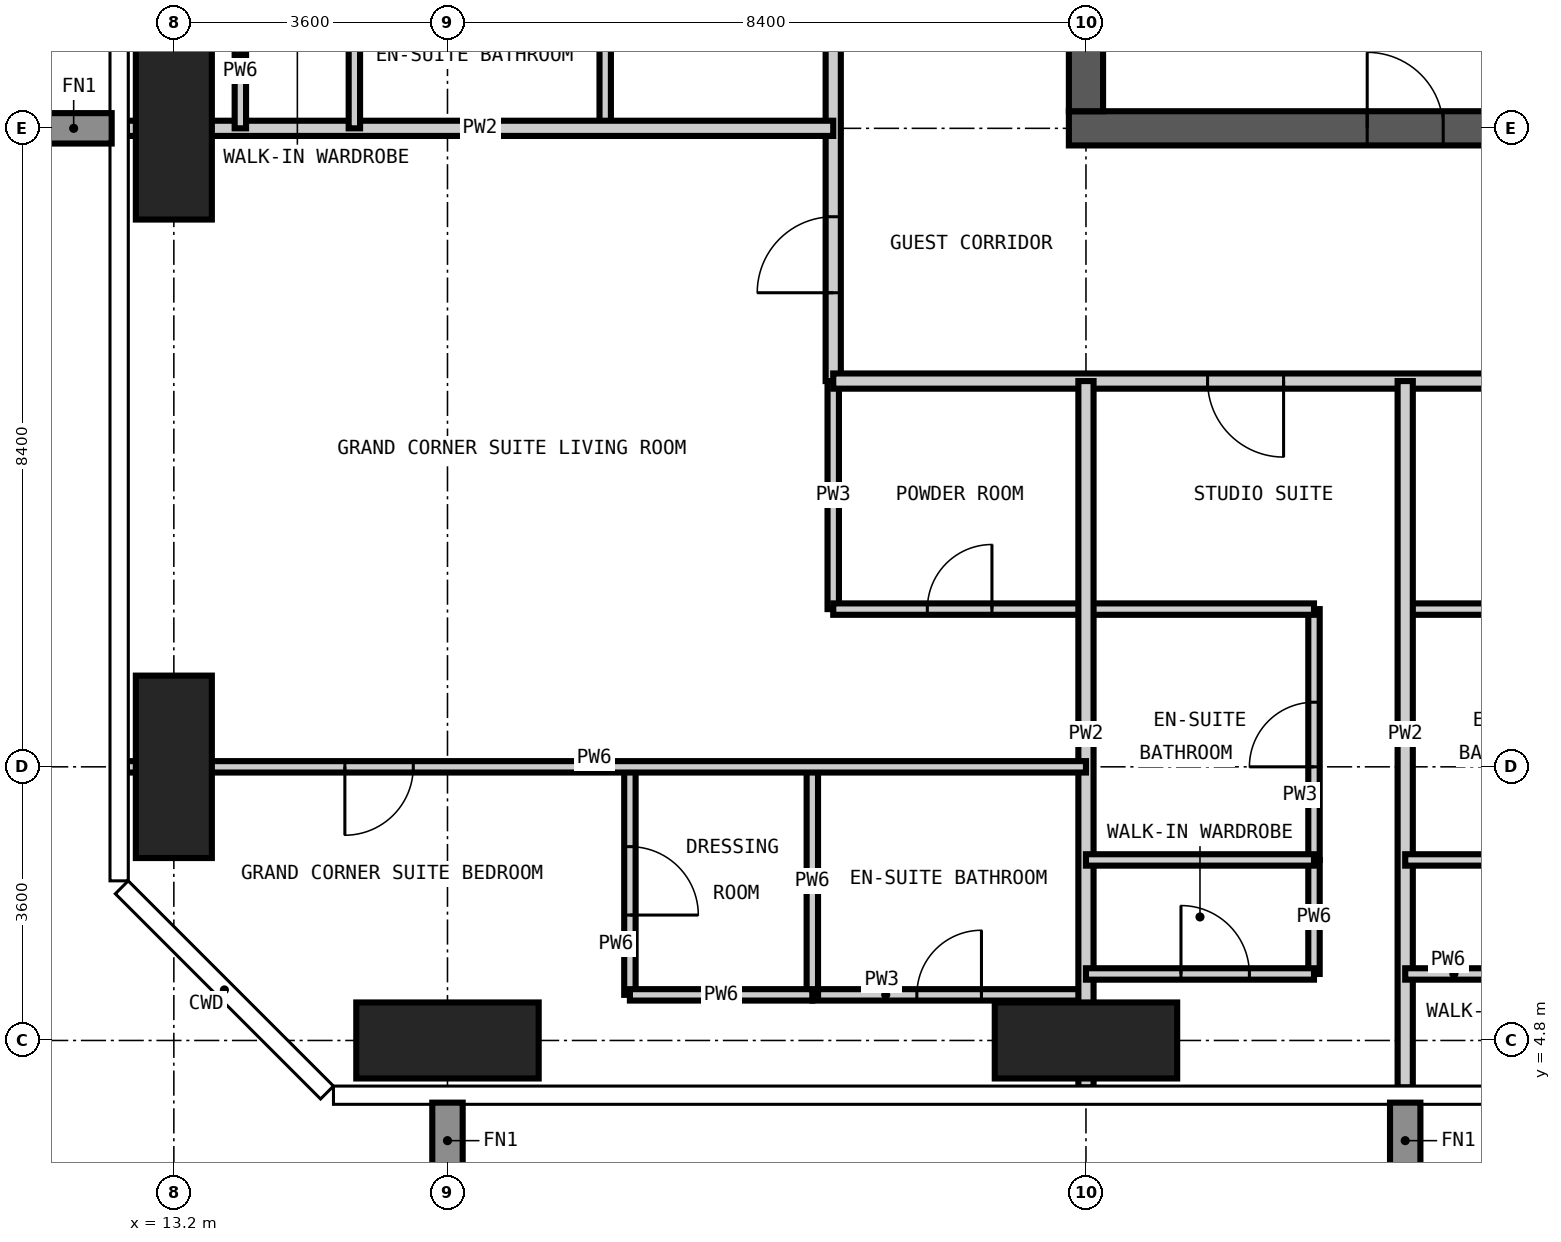
"""IFC4 building model, lengths in metres.
Left out: names, types, materials, properties, quantities, classifications, styles, units other than length and angle.
Written with IfcOpenShell. Run it as: python <this file> out.ifc"""

import sys

from ifc_helpers import new_model, si_unit, direction, frame, frame_2d, origin, origin_2d, place, context, subcontext, project, spatial, rectangle, extrude, element, fill, save


model = new_model("IFC4")
c1 = context("Model", 3, precision=1e-05, world=origin(), true_north=direction((0.0, 1.0)))
c2 = subcontext(c1, "Body", "Model", "MODEL_VIEW")
j1 = project(units=[si_unit("LENGTHUNIT", "METRE"), si_unit("PLANEANGLEUNIT", "RADIAN")], contexts=[c1])
p1 = place(None, origin())
s1 = spatial("IfcSite", under=j1, at=p1, CompositionType="ELEMENT")
p2 = place(p1, origin())
s2 = spatial("IfcBuilding", under=s1, at=p2, CompositionType="ELEMENT")
p3 = place(p2, frame((0.0, 0.0, 241.2)))
s3 = spatial("IfcBuildingStorey", under=s2, at=p3, CompositionType="ELEMENT", Elevation=241.2)
for number, where, z_axis, x_axis in (
    (1, (13.2, 8.4, -0.35), (0.0, 0.0, 1.0), (1.0, 0.0, 0.0)),
    (2, (13.2, 16.8, -0.35), (0.0, 0.0, 1.0), (1.0, 0.0, 0.0)),
):
    element("IfcColumn", number, at=place(p3, frame(where, z_axis=z_axis, x_axis=x_axis)), inside=s3, PredefinedType="COLUMN", context=c2, shape_type="SweptSolid", body=[
        extrude(rectangle(XDim=1.0, YDim=2.4, at=origin_2d()), origin(), (0.0, 0.0, 1.0), 3.9),
    ])
for number, where, z_axis, x_axis in (
    (3, (16.8, 4.8, -0.35), (0.0, 0.0, 1.0), (1.0, 0.0, 0.0)),
    (4, (25.2, 4.8, -0.35), (0.0, 0.0, 1.0), (1.0, 0.0, 0.0)),
):
    element("IfcColumn", number, at=place(p3, frame(where, z_axis=z_axis, x_axis=x_axis)), inside=s3, PredefinedType="COLUMN", context=c2, shape_type="SweptSolid", body=[
        extrude(rectangle(XDim=2.4, YDim=1.0, at=origin_2d()), origin(), (0.0, 0.0, 1.0), 3.9),
    ])
p4 = place(p3, frame((24.975, 16.8, -0.35), z_axis=(0.0, 0.0, 1.0), x_axis=(1.0, 0.0, 0.0)))
e5 = element("IfcWall", 5, at=p4, inside=s3, PredefinedType="SHEAR", context=c2, shape_type="SweptSolid", body=[
    extrude(rectangle(XDim=17.25, YDim=0.45, at=frame_2d((8.625, 0.0))), origin(), (0.0, 0.0, 1.0), 3.9),
])
p5 = place(p4, frame((3.925, 0.0, 0.35)))
e6 = element("IfcOpeningElement", 6, at=p5, cuts=e5, PredefinedType="OPENING", context=c2, shape_type="SweptSolid", body=[
    extrude(rectangle(XDim=1.0, YDim=2.1, at=frame_2d((0.5, 1.05))), frame((0.0, 0.235, 0.0), z_axis=(0.0, -1.0, 0.0), x_axis=(1.0, 0.0, 0.0)), (0.0, 0.0, 1.0), 0.47),
])
p6 = place(p4, frame((10.225, 0.0, 0.35)))
e7 = element("IfcOpeningElement", 7, at=p6, cuts=e5, PredefinedType="OPENING", context=c2, shape_type="SweptSolid", body=[
    extrude(rectangle(XDim=1.0, YDim=2.1, at=frame_2d((0.5, 1.05))), frame((0.0, 0.235, 0.0), z_axis=(0.0, -1.0, 0.0), x_axis=(1.0, 0.0, 0.0)), (0.0, 0.0, 1.0), 0.47),
])
p7 = place(p3, frame((25.2, 41.775, -0.35), z_axis=(0.0, 0.0, 1.0), x_axis=(0.0, -1.0, 0.0)))
e8 = element("IfcWall", 8, at=p7, inside=s3, PredefinedType="SHEAR", context=c2, shape_type="SweptSolid", body=[
    extrude(rectangle(XDim=24.75, YDim=0.45, at=frame_2d((12.375, 0.0))), origin(), (0.0, 0.0, 1.0), 3.9),
])
p8 = place(p7, frame((11.875, 0.0, 0.35)))
e9 = element("IfcOpeningElement", 9, at=p8, cuts=e8, PredefinedType="OPENING", context=c2, shape_type="SweptSolid", body=[
    extrude(rectangle(XDim=1.0, YDim=2.1, at=frame_2d((0.5, 1.05))), frame((0.0, 0.235, 0.0), z_axis=(0.0, -1.0, 0.0), x_axis=(1.0, 0.0, 0.0)), (0.0, 0.0, 1.0), 0.47),
])
for number, where, z_axis, x_axis in (
    (10, (18.875, 16.8, 0.0), (0.0, 0.0, 1.0), (0.0, 1.0, 0.0)),
    (11, (21.875, 10.475, 0.0), (0.0, 0.0, 1.0), (0.0, 1.0, 0.0)),
):
    element("IfcWall", number, at=place(p3, frame(where, z_axis=z_axis, x_axis=x_axis)), inside=s3, PredefinedType="PARTITIONING", context=c2, shape_type="SweptSolid", body=[
        extrude(rectangle(XDim=3.0, YDim=0.15, at=frame_2d((1.5, 0.0))), origin(), (0.0, 0.0, 1.0), 3.55),
    ])
p9 = place(p3, frame((28.2, 7.175, 0.0), z_axis=(0.0, 0.0, 1.0), x_axis=(0.0, 1.0, 0.0)))
e12 = element("IfcWall", 12, at=p9, inside=s3, PredefinedType="PARTITIONING", context=c2, shape_type="SweptSolid", body=[
    extrude(rectangle(XDim=3.3, YDim=0.15, at=frame_2d((1.65, 0.0))), origin(), (0.0, 0.0, 1.0), 3.55),
])
p10 = place(p9, frame((1.225, 0.0, 0.0)))
e13 = element("IfcOpeningElement", 13, at=p10, cuts=e12, PredefinedType="OPENING", context=c2, shape_type="SweptSolid", body=[
    extrude(rectangle(XDim=0.85, YDim=2.1, at=frame_2d((0.425, 1.05))), frame((0.0, 0.085, 0.0), z_axis=(0.0, -1.0, 0.0), x_axis=(1.0, 0.0, 0.0)), (0.0, 0.0, 1.0), 0.17),
])
p11 = place(p3, frame((21.6, 5.4, 0.0), z_axis=(0.0, 0.0, 1.0), x_axis=(1.0, 0.0, 0.0)))
e14 = element("IfcWall", 14, at=p11, inside=s3, PredefinedType="PARTITIONING", context=c2, shape_type="SweptSolid", body=[
    extrude(rectangle(XDim=3.6, YDim=0.15, at=frame_2d((1.8, 0.0))), origin(), (0.0, 0.0, 1.0), 3.55),
])
p12 = place(p11, frame((1.375, 0.0, 0.0)))
e15 = element("IfcOpeningElement", 15, at=p12, cuts=e14, PredefinedType="OPENING", context=c2, shape_type="SweptSolid", body=[
    extrude(rectangle(XDim=0.85, YDim=2.1, at=frame_2d((0.425, 1.05))), frame((0.0, 0.085, 0.0), z_axis=(0.0, -1.0, 0.0), x_axis=(1.0, 0.0, 0.0)), (0.0, 0.0, 1.0), 0.17),
])
p13 = place(p3, frame((21.875, 10.475, 0.0), z_axis=(0.0, 0.0, 1.0), x_axis=(1.0, 0.0, 0.0)))
e16 = element("IfcWall", 16, at=p13, inside=s3, PredefinedType="PARTITIONING", context=c2, shape_type="SweptSolid", body=[
    extrude(rectangle(XDim=6.325, YDim=0.15, at=frame_2d((3.163, 0.0))), origin(), (0.0, 0.0, 1.0), 3.55),
])
p14 = place(p13, frame((1.238, 0.0, 0.0)))
e17 = element("IfcOpeningElement", 17, at=p14, cuts=e16, PredefinedType="OPENING", context=c2, shape_type="SweptSolid", body=[
    extrude(rectangle(XDim=0.85, YDim=2.1, at=frame_2d((0.425, 1.05))), frame((0.0, 0.085, 0.0), z_axis=(0.0, -1.0, 0.0), x_axis=(1.0, 0.0, 0.0)), (0.0, 0.0, 1.0), 0.17),
])
p15 = place(p3, frame((29.4, 10.475, 0.0), z_axis=(0.0, 0.0, 1.0), x_axis=(1.0, 0.0, 0.0)))
e18 = element("IfcWall", 18, at=p15, inside=s3, PredefinedType="PARTITIONING", context=c2, shape_type="SweptSolid", body=[
    extrude(rectangle(XDim=3.0, YDim=0.15, at=frame_2d((1.5, 0.0))), origin(), (0.0, 0.0, 1.0), 3.55),
])
p16 = place(p3, frame((21.875, 13.475, 0.0), z_axis=(0.0, 0.0, 1.0), x_axis=(0.0, 1.0, 0.0)))
e19 = element("IfcWall", 19, at=p16, inside=s3, PredefinedType="PARTITIONING", context=c2, shape_type="SweptSolid", body=[
    extrude(rectangle(XDim=31.25, YDim=0.2, at=frame_2d((15.625, 0.0))), origin(), (0.0, 0.0, 1.0), 3.55),
])
p17 = place(p16, frame((7.025, 0.0, 0.0)))
e20 = element("IfcOpeningElement", 20, at=p17, cuts=e19, PredefinedType="OPENING", context=c2, shape_type="SweptSolid", body=[
    extrude(rectangle(XDim=1.0, YDim=2.2, at=frame_2d((0.5, 1.1))), frame((0.0, 0.11, 0.0), z_axis=(0.0, -1.0, 0.0), x_axis=(1.0, 0.0, 0.0)), (0.0, 0.0, 1.0), 0.22),
])
p18 = place(p16, frame((15.425, 0.0, 0.0)))
e21 = element("IfcOpeningElement", 21, at=p18, cuts=e19, PredefinedType="OPENING", context=c2, shape_type="SweptSolid", body=[
    extrude(rectangle(XDim=1.0, YDim=2.2, at=frame_2d((0.5, 1.1))), frame((0.0, 0.11, 0.0), z_axis=(0.0, -1.0, 0.0), x_axis=(1.0, 0.0, 0.0)), (0.0, 0.0, 1.0), 0.22),
])
p19 = place(p16, frame((23.825, 0.0, 0.0)))
e22 = element("IfcOpeningElement", 22, at=p19, cuts=e19, PredefinedType="OPENING", context=c2, shape_type="SweptSolid", body=[
    extrude(rectangle(XDim=1.0, YDim=2.2, at=frame_2d((0.5, 1.1))), frame((0.0, 0.11, 0.0), z_axis=(0.0, -1.0, 0.0), x_axis=(1.0, 0.0, 0.0)), (0.0, 0.0, 1.0), 0.22),
])
p20 = place(p16, frame((1.162, 0.0, 0.0)))
e23 = element("IfcOpeningElement", 23, at=p20, cuts=e19, PredefinedType="OPENING", context=c2, shape_type="SweptSolid", body=[
    extrude(rectangle(XDim=1.0, YDim=2.2, at=frame_2d((0.5, 1.1))), frame((0.0, 0.11, 0.0), z_axis=(0.0, -1.0, 0.0), x_axis=(1.0, 0.0, 0.0)), (0.0, 0.0, 1.0), 0.22),
])
p21 = place(p16, frame((29.387, 0.0, 0.0)))
e24 = element("IfcOpeningElement", 24, at=p21, cuts=e19, PredefinedType="OPENING", context=c2, shape_type="SweptSolid", body=[
    extrude(rectangle(XDim=1.0, YDim=2.2, at=frame_2d((0.5, 1.1))), frame((0.0, 0.11, 0.0), z_axis=(0.0, -1.0, 0.0), x_axis=(1.0, 0.0, 0.0)), (0.0, 0.0, 1.0), 0.22),
])
p22 = place(p3, frame((44.125, 13.475, 0.0), z_axis=(0.0, 0.0, 1.0), x_axis=(-1.0, 0.0, 0.0)))
e25 = element("IfcWall", 25, at=p22, inside=s3, PredefinedType="PARTITIONING", context=c2, shape_type="SweptSolid", body=[
    extrude(rectangle(XDim=22.25, YDim=0.2, at=frame_2d((11.125, 0.0))), origin(), (0.0, 0.0, 1.0), 3.55),
])
p23 = place(p22, frame((16.325, 0.0, 0.0)))
e26 = element("IfcOpeningElement", 26, at=p23, cuts=e25, PredefinedType="OPENING", context=c2, shape_type="SweptSolid", body=[
    extrude(rectangle(XDim=1.0, YDim=2.2, at=frame_2d((0.5, 1.1))), frame((0.0, 0.11, 0.0), z_axis=(0.0, -1.0, 0.0), x_axis=(1.0, 0.0, 0.0)), (0.0, 0.0, 1.0), 0.22),
])
p24 = place(p22, frame((10.025, 0.0, 0.0)))
e27 = element("IfcOpeningElement", 27, at=p24, cuts=e25, PredefinedType="OPENING", context=c2, shape_type="SweptSolid", body=[
    extrude(rectangle(XDim=1.0, YDim=2.2, at=frame_2d((0.5, 1.1))), frame((0.0, 0.11, 0.0), z_axis=(0.0, -1.0, 0.0), x_axis=(1.0, 0.0, 0.0)), (0.0, 0.0, 1.0), 0.22),
])
p25 = place(p22, frame((3.725, 0.0, 0.0)))
e28 = element("IfcOpeningElement", 28, at=p25, cuts=e25, PredefinedType="OPENING", context=c2, shape_type="SweptSolid", body=[
    extrude(rectangle(XDim=1.0, YDim=2.2, at=frame_2d((0.5, 1.1))), frame((0.0, 0.11, 0.0), z_axis=(0.0, -1.0, 0.0), x_axis=(1.0, 0.0, 0.0)), (0.0, 0.0, 1.0), 0.22),
])
for number, where, z_axis, x_axis in (
    (29, (25.2, 4.182, 0.0), (0.0, 0.0, 1.0), (0.0, 1.0, 0.0)),
    (30, (29.4, 4.182, 0.0), (0.0, 0.0, 1.0), (0.0, 1.0, 0.0)),
):
    element("IfcWall", number, at=place(p3, frame(where, z_axis=z_axis, x_axis=x_axis)), inside=s3, PredefinedType="PARTITIONING", context=c2, shape_type="SweptSolid", body=[
        extrude(rectangle(XDim=9.293, YDim=0.2, at=frame_2d((4.646, 0.0))), origin(), (0.0, 0.0, 1.0), 3.55),
    ])
p26 = place(p3, frame((12.582, 16.8, 0.0), z_axis=(0.0, 0.0, 1.0), x_axis=(1.0, 0.0, 0.0)))
e31 = element("IfcWall", 31, at=p26, inside=s3, PredefinedType="PARTITIONING", context=c2, shape_type="SweptSolid", body=[
    extrude(rectangle(XDim=9.293, YDim=0.2, at=frame_2d((4.646, 0.0))), origin(), (0.0, 0.0, 1.0), 3.55),
])
p27 = place(p3, frame((14.075, 16.8, 0.0), z_axis=(0.0, 0.0, 1.0), x_axis=(0.0, 1.0, 0.0)))
e32 = element("IfcWall", 32, at=p27, inside=s3, PredefinedType="PARTITIONING", context=c2, shape_type="SweptSolid", body=[
    extrude(rectangle(XDim=3.0, YDim=0.15, at=frame_2d((1.5, 0.0))), origin(), (0.0, 0.0, 1.0), 3.55),
])
p28 = place(p27, frame((1.25, 0.0, 0.0)))
e33 = element("IfcOpeningElement", 33, at=p28, cuts=e32, PredefinedType="OPENING", context=c2, shape_type="SweptSolid", body=[
    extrude(rectangle(XDim=0.9, YDim=2.1, at=frame_2d((0.45, 1.05))), frame((0.0, 0.085, 0.0), z_axis=(0.0, -1.0, 0.0), x_axis=(1.0, 0.0, 0.0)), (0.0, 0.0, 1.0), 0.17),
])
p29 = place(p3, frame((15.575, 16.8, 0.0), z_axis=(0.0, 0.0, 1.0), x_axis=(0.0, 1.0, 0.0)))
e34 = element("IfcWall", 34, at=p29, inside=s3, PredefinedType="PARTITIONING", context=c2, shape_type="SweptSolid", body=[
    extrude(rectangle(XDim=3.0, YDim=0.15, at=frame_2d((1.5, 0.0))), origin(), (0.0, 0.0, 1.0), 3.55),
])
p30 = place(p3, frame((19.2, 5.4, 0.0), z_axis=(0.0, 0.0, 1.0), x_axis=(0.0, 1.0, 0.0)))
e35 = element("IfcWall", 35, at=p30, inside=s3, PredefinedType="PARTITIONING", context=c2, shape_type="SweptSolid", body=[
    extrude(rectangle(XDim=3.0, YDim=0.15, at=frame_2d((1.5, 0.0))), origin(), (0.0, 0.0, 1.0), 3.55),
])
p31 = place(p30, frame((1.05, 0.0, 0.0)))
e36 = element("IfcOpeningElement", 36, at=p31, cuts=e35, PredefinedType="OPENING", context=c2, shape_type="SweptSolid", body=[
    extrude(rectangle(XDim=0.9, YDim=2.1, at=frame_2d((0.45, 1.05))), frame((0.0, 0.085, 0.0), z_axis=(0.0, -1.0, 0.0), x_axis=(1.0, 0.0, 0.0)), (0.0, 0.0, 1.0), 0.17),
])
p32 = place(p3, frame((21.6, 5.4, 0.0), z_axis=(0.0, 0.0, 1.0), x_axis=(0.0, 1.0, 0.0)))
e37 = element("IfcWall", 37, at=p32, inside=s3, PredefinedType="PARTITIONING", context=c2, shape_type="SweptSolid", body=[
    extrude(rectangle(XDim=3.0, YDim=0.15, at=frame_2d((1.5, 0.0))), origin(), (0.0, 0.0, 1.0), 3.55),
])
p33 = place(p3, frame((28.2, 5.675, 0.0), z_axis=(0.0, 0.0, 1.0), x_axis=(0.0, 1.0, 0.0)))
e38 = element("IfcWall", 38, at=p33, inside=s3, PredefinedType="PARTITIONING", context=c2, shape_type="SweptSolid", body=[
    extrude(rectangle(XDim=1.5, YDim=0.15, at=frame_2d((0.75, 0.0))), origin(), (0.0, 0.0, 1.0), 3.55),
])
p34 = place(p3, frame((19.2, 5.4, 0.0), z_axis=(0.0, 0.0, 1.0), x_axis=(1.0, 0.0, 0.0)))
e39 = element("IfcWall", 39, at=p34, inside=s3, PredefinedType="PARTITIONING", context=c2, shape_type="SweptSolid", body=[
    extrude(rectangle(XDim=2.4, YDim=0.15, at=frame_2d((1.2, 0.0))), origin(), (0.0, 0.0, 1.0), 3.55),
])
p35 = place(p3, frame((25.2, 5.675, 0.0), z_axis=(0.0, 0.0, 1.0), x_axis=(1.0, 0.0, 0.0)))
e40 = element("IfcWall", 40, at=p35, inside=s3, PredefinedType="PARTITIONING", context=c2, shape_type="SweptSolid", body=[
    extrude(rectangle(XDim=3.0, YDim=0.15, at=frame_2d((1.5, 0.0))), origin(), (0.0, 0.0, 1.0), 3.55),
])
p36 = place(p35, frame((1.25, 0.0, 0.0)))
e41 = element("IfcOpeningElement", 41, at=p36, cuts=e40, PredefinedType="OPENING", context=c2, shape_type="SweptSolid", body=[
    extrude(rectangle(XDim=0.9, YDim=2.1, at=frame_2d((0.45, 1.05))), frame((0.0, 0.085, 0.0), z_axis=(0.0, -1.0, 0.0), x_axis=(1.0, 0.0, 0.0)), (0.0, 0.0, 1.0), 0.17),
])
p37 = place(p3, frame((29.4, 5.675, 0.0), z_axis=(0.0, 0.0, 1.0), x_axis=(1.0, 0.0, 0.0)))
e42 = element("IfcWall", 42, at=p37, inside=s3, PredefinedType="PARTITIONING", context=c2, shape_type="SweptSolid", body=[
    extrude(rectangle(XDim=3.0, YDim=0.15, at=frame_2d((1.5, 0.0))), origin(), (0.0, 0.0, 1.0), 3.55),
])
p38 = place(p37, frame((1.05, 0.0, 0.0)))
e43 = element("IfcOpeningElement", 43, at=p38, cuts=e42, PredefinedType="OPENING", context=c2, shape_type="SweptSolid", body=[
    extrude(rectangle(XDim=0.9, YDim=2.1, at=frame_2d((0.45, 1.05))), frame((0.0, 0.085, 0.0), z_axis=(0.0, -1.0, 0.0), x_axis=(1.0, 0.0, 0.0)), (0.0, 0.0, 1.0), 0.17),
])
for number, where, z_axis, x_axis in (
    (44, (25.2, 7.175, 0.0), (0.0, 0.0, 1.0), (1.0, 0.0, 0.0)),
    (45, (29.4, 7.175, 0.0), (0.0, 0.0, 1.0), (1.0, 0.0, 0.0)),
):
    element("IfcWall", number, at=place(p3, frame(where, z_axis=z_axis, x_axis=x_axis)), inside=s3, PredefinedType="PARTITIONING", context=c2, shape_type="SweptSolid", body=[
        extrude(rectangle(XDim=3.0, YDim=0.15, at=frame_2d((1.5, 0.0))), origin(), (0.0, 0.0, 1.0), 3.55),
    ])
p39 = place(p3, frame((12.582, 8.4, 0.0), z_axis=(0.0, 0.0, 1.0), x_axis=(1.0, 0.0, 0.0)))
e46 = element("IfcWall", 46, at=p39, inside=s3, PredefinedType="PARTITIONING", context=c2, shape_type="SweptSolid", body=[
    extrude(rectangle(XDim=12.618, YDim=0.15, at=frame_2d((6.309, 0.0))), origin(), (0.0, 0.0, 1.0), 3.55),
])
p40 = place(p39, frame((2.868, 0.0, 0.0)))
e47 = element("IfcOpeningElement", 47, at=p40, cuts=e46, PredefinedType="OPENING", context=c2, shape_type="SweptSolid", body=[
    extrude(rectangle(XDim=0.9, YDim=2.1, at=frame_2d((0.45, 1.05))), frame((0.0, 0.085, 0.0), z_axis=(0.0, -1.0, 0.0), x_axis=(1.0, 0.0, 0.0)), (0.0, 0.0, 1.0), 0.17),
])
p41 = place(p23, origin())
e48 = element("IfcDoor", 48, at=p41, inside=s3, OperationType="SINGLE_SWING_LEFT", PredefinedType="DOOR", context=c2, shape_type="SweptSolid", body=[
    extrude(rectangle(XDim=1.0, YDim=2.2, at=frame_2d((0.5, 1.1))), frame((0.0, 0.025, 0.0), z_axis=(0.0, -1.0, 0.0), x_axis=(1.0, 0.0, 0.0)), (0.0, 0.0, 1.0), 0.05),
])
fill(e26, e48)
p42 = place(p10, origin())
e49 = element("IfcDoor", 49, at=p42, inside=s3, OperationType="SINGLE_SWING_LEFT", PredefinedType="DOOR", context=c2, shape_type="SweptSolid", body=[
    extrude(rectangle(XDim=0.85, YDim=2.1, at=frame_2d((0.425, 1.05))), frame((0.0, 0.025, 0.0), z_axis=(0.0, -1.0, 0.0), x_axis=(1.0, 0.0, 0.0)), (0.0, 0.0, 1.0), 0.05),
])
fill(e13, e49)
p43 = place(p36, origin())
e50 = element("IfcDoor", 50, at=p43, inside=s3, OperationType="SINGLE_SWING_LEFT", PredefinedType="DOOR", context=c2, shape_type="SweptSolid", body=[
    extrude(rectangle(XDim=0.9, YDim=2.1, at=frame_2d((0.45, 1.05))), frame((0.0, 0.025, 0.0), z_axis=(0.0, -1.0, 0.0), x_axis=(1.0, 0.0, 0.0)), (0.0, 0.0, 1.0), 0.05),
])
fill(e41, e50)
p44 = place(p20, origin())
e51 = element("IfcDoor", 51, at=p44, inside=s3, OperationType="SINGLE_SWING_LEFT", PredefinedType="DOOR", context=c2, shape_type="SweptSolid", body=[
    extrude(rectangle(XDim=1.0, YDim=2.2, at=frame_2d((0.5, 1.1))), frame((0.0, 0.025, 0.0), z_axis=(0.0, -1.0, 0.0), x_axis=(1.0, 0.0, 0.0)), (0.0, 0.0, 1.0), 0.05),
])
fill(e23, e51)
p45 = place(p14, origin())
e52 = element("IfcDoor", 52, at=p45, inside=s3, OperationType="SINGLE_SWING_RIGHT", PredefinedType="DOOR", context=c2, shape_type="SweptSolid", body=[
    extrude(rectangle(XDim=0.85, YDim=2.1, at=frame_2d((0.425, 1.05))), frame((0.0, 0.025, 0.0), z_axis=(0.0, -1.0, 0.0), x_axis=(1.0, 0.0, 0.0)), (0.0, 0.0, 1.0), 0.05),
])
fill(e17, e52)
p46 = place(p40, frame((0.9, 0.0, 0.0), z_axis=(0.0, 0.0, 1.0), x_axis=(-1.0, 0.0, 0.0)))
e53 = element("IfcDoor", 53, at=p46, inside=s3, OperationType="SINGLE_SWING_RIGHT", PredefinedType="DOOR", context=c2, shape_type="SweptSolid", body=[
    extrude(rectangle(XDim=0.9, YDim=2.1, at=frame_2d((0.45, 1.05))), frame((0.0, 0.025, 0.0), z_axis=(0.0, -1.0, 0.0), x_axis=(1.0, 0.0, 0.0)), (0.0, 0.0, 1.0), 0.05),
])
fill(e47, e53)
p47 = place(p12, origin())
e54 = element("IfcDoor", 54, at=p47, inside=s3, OperationType="SINGLE_SWING_RIGHT", PredefinedType="DOOR", context=c2, shape_type="SweptSolid", body=[
    extrude(rectangle(XDim=0.85, YDim=2.1, at=frame_2d((0.425, 1.05))), frame((0.0, 0.025, 0.0), z_axis=(0.0, -1.0, 0.0), x_axis=(1.0, 0.0, 0.0)), (0.0, 0.0, 1.0), 0.05),
])
fill(e15, e54)
p48 = place(p31, frame((0.9, 0.0, 0.0), z_axis=(0.0, 0.0, 1.0), x_axis=(-1.0, 0.0, 0.0)))
e55 = element("IfcDoor", 55, at=p48, inside=s3, OperationType="SINGLE_SWING_RIGHT", PredefinedType="DOOR", context=c2, shape_type="SweptSolid", body=[
    extrude(rectangle(XDim=0.9, YDim=2.1, at=frame_2d((0.45, 1.05))), frame((0.0, 0.025, 0.0), z_axis=(0.0, -1.0, 0.0), x_axis=(1.0, 0.0, 0.0)), (0.0, 0.0, 1.0), 0.05),
])
fill(e36, e55)
p49 = place(p5, origin())
e56 = element("IfcDoor", 56, at=p49, inside=s3, OperationType="SINGLE_SWING_LEFT", PredefinedType="DOOR", context=c2, shape_type="SweptSolid", body=[
    extrude(rectangle(XDim=1.0, YDim=2.1, at=frame_2d((0.5, 1.05))), frame((0.0, 0.025, 0.0), z_axis=(0.0, -1.0, 0.0), x_axis=(1.0, 0.0, 0.0)), (0.0, 0.0, 1.0), 0.05),
])
fill(e6, e56)
save(model, sys.argv[1])
